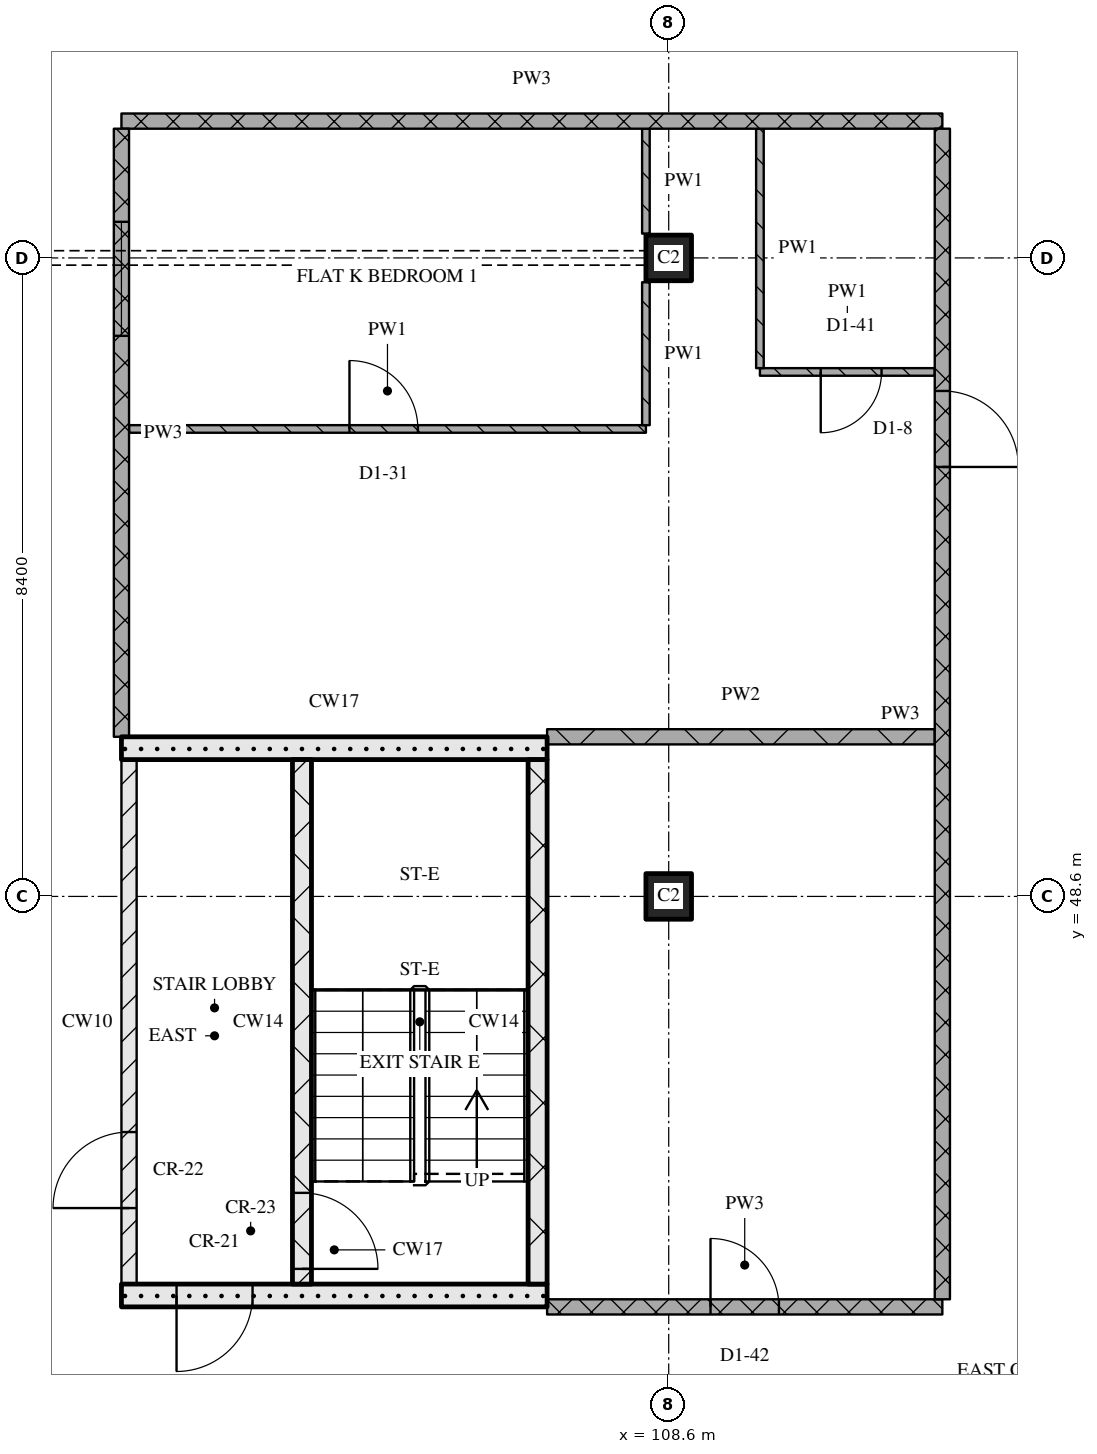
"""IFC4 building model, lengths in metres.
Left out: names, types, materials, properties, quantities, classifications, styles, units other than length and angle.
Written with IfcOpenShell. Run it as: python <this file> out.ifc"""

import sys

from ifc_helpers import new_model, si_unit, direction, frame, frame_2d, origin, origin_2d, place, context, subcontext, project, spatial, rectangle, extrude, element, fill, save


model = new_model("IFC4")
c1 = context("Model", 3, precision=1e-05, world=origin(), true_north=direction((0.0, 1.0)))
c2 = subcontext(c1, "Body", "Model", "MODEL_VIEW")
j1 = project(units=[si_unit("LENGTHUNIT", "METRE"), si_unit("PLANEANGLEUNIT", "RADIAN")], contexts=[c1])
p1 = place(None, origin())
s1 = spatial("IfcSite", under=j1, at=p1, CompositionType="ELEMENT")
p2 = place(p1, origin())
s2 = spatial("IfcBuilding", under=s1, at=p2, CompositionType="ELEMENT")
p3 = place(p2, frame((0.0, 0.0, 212.7)))
s3 = spatial("IfcBuildingStorey", under=s2, at=p3, CompositionType="ELEMENT", Elevation=212.7)
for number, where, z_axis, x_axis in (
    (1, (108.6, 48.6, 0.0), (0.0, 0.0, 1.0), (1.0, 0.0, 0.0)),
    (2, (108.6, 57.0, 0.0), (0.0, 0.0, 1.0), (1.0, 0.0, 0.0)),
):
    element("IfcColumn", number, at=place(p3, frame(where, z_axis=z_axis, x_axis=x_axis)), inside=s3, PredefinedType="COLUMN", context=c2, shape_type="SweptSolid", body=[
        extrude(rectangle(XDim=0.6, YDim=0.6, at=origin_2d()), origin(), (0.0, 0.0, 1.0), 3.6),
    ])
p4 = place(p3, frame((101.4, 43.35, 0.0), z_axis=(0.0, 0.0, 1.0), x_axis=(1.0, 0.0, 0.0)))
e3 = element("IfcWall", 3, at=p4, inside=s3, PredefinedType="SOLIDWALL", context=c2, shape_type="SweptSolid", body=[
    extrude(rectangle(XDim=5.6, YDim=0.3, at=frame_2d((2.8, 0.0))), origin(), (0.0, 0.0, 1.0), 3.32),
])
p5 = place(p4, frame((0.725, 0.0, 0.0)))
e4 = element("IfcOpeningElement", 4, at=p5, cuts=e3, PredefinedType="OPENING", context=c2, shape_type="SweptSolid", body=[
    extrude(rectangle(XDim=1.0, YDim=2.1, at=frame_2d((0.5, 1.05))), frame((0.0, 0.16, 0.0), z_axis=(0.0, -1.0, 0.0), x_axis=(1.0, 0.0, 0.0)), (0.0, 0.0, 1.0), 0.32),
])
p6 = place(p3, frame((101.5, 43.5, 0.0), z_axis=(0.0, 0.0, 1.0), x_axis=(0.0, 1.0, 0.0)))
e5 = element("IfcWall", 5, at=p6, inside=s3, PredefinedType="PARTITIONING", context=c2, shape_type="SweptSolid", body=[
    extrude(rectangle(XDim=6.9, YDim=0.2, at=frame_2d((3.45, 0.0))), origin(), (0.0, 0.0, 1.0), 3.32),
])
p7 = place(p6, frame((1.0, 0.0, 0.0)))
e6 = element("IfcOpeningElement", 6, at=p7, cuts=e5, PredefinedType="OPENING", context=c2, shape_type="SweptSolid", body=[
    extrude(rectangle(XDim=1.0, YDim=2.1, at=frame_2d((0.5, 1.05))), frame((0.0, 0.11, 0.0), z_axis=(0.0, -1.0, 0.0), x_axis=(1.0, 0.0, 0.0)), (0.0, 0.0, 1.0), 0.22),
])
p8 = place(p3, frame((103.775, 43.5, 0.0), z_axis=(0.0, 0.0, 1.0), x_axis=(0.0, 1.0, 0.0)))
e7 = element("IfcWall", 7, at=p8, inside=s3, PredefinedType="SOLIDWALL", context=c2, shape_type="SweptSolid", body=[
    extrude(rectangle(XDim=6.9, YDim=0.25, at=frame_2d((3.45, 0.0))), origin(), (0.0, 0.0, 1.0), 3.32),
])
p9 = place(p8, frame((0.2, 0.0, 0.0)))
e8 = element("IfcOpeningElement", 8, at=p9, cuts=e7, PredefinedType="OPENING", context=c2, shape_type="SweptSolid", body=[
    extrude(rectangle(XDim=1.0, YDim=2.1, at=frame_2d((0.5, 1.05))), frame((0.0, 0.135, 0.0), z_axis=(0.0, -1.0, 0.0), x_axis=(1.0, 0.0, 0.0)), (0.0, 0.0, 1.0), 0.27),
])
p10 = place(p3, frame((106.875, 43.5, 0.0), z_axis=(0.0, 0.0, 1.0), x_axis=(0.0, 1.0, 0.0)))
e9 = element("IfcWall", 9, at=p10, inside=s3, PredefinedType="SOLIDWALL", context=c2, shape_type="SweptSolid", body=[
    extrude(rectangle(XDim=6.9, YDim=0.25, at=frame_2d((3.45, 0.0))), origin(), (0.0, 0.0, 1.0), 3.32),
])
p11 = place(p3, frame((101.4, 50.55, 0.0), z_axis=(0.0, 0.0, 1.0), x_axis=(1.0, 0.0, 0.0)))
e10 = element("IfcWall", 10, at=p11, inside=s3, PredefinedType="SOLIDWALL", context=c2, shape_type="SweptSolid", body=[
    extrude(rectangle(XDim=5.6, YDim=0.3, at=frame_2d((2.8, 0.0))), origin(), (0.0, 0.0, 1.0), 3.32),
])
p12 = place(p3, frame((107.0, 43.2, 0.0), z_axis=(0.0, 0.0, 1.0), x_axis=(1.0, 0.0, 0.0)))
e11 = element("IfcWall", 11, at=p12, inside=s3, PredefinedType="PARTITIONING", context=c2, shape_type="SweptSolid", body=[
    extrude(rectangle(XDim=5.2, YDim=0.2, at=frame_2d((2.6, 0.0))), origin(), (0.0, 0.0, 1.0), 3.32),
])
p13 = place(p12, frame((2.15, 0.0, 0.0)))
e12 = element("IfcOpeningElement", 12, at=p13, cuts=e11, PredefinedType="OPENING", context=c2, shape_type="SweptSolid", body=[
    extrude(rectangle(XDim=0.9, YDim=2.1, at=frame_2d((0.45, 1.05))), frame((0.0, 0.11, 0.0), z_axis=(0.0, -1.0, 0.0), x_axis=(1.0, 0.0, 0.0)), (0.0, 0.0, 1.0), 0.22),
])
p14 = place(p3, frame((107.0, 50.7, 0.0), z_axis=(0.0, 0.0, 1.0), x_axis=(1.0, 0.0, 0.0)))
e13 = element("IfcWall", 13, at=p14, inside=s3, PredefinedType="PARTITIONING", context=c2, shape_type="SweptSolid", body=[
    extrude(rectangle(XDim=5.1, YDim=0.2, at=frame_2d((2.55, 0.0))), origin(), (0.0, 0.0, 1.0), 3.32),
])
p15 = place(p3, frame((101.5, 54.75, 0.0), z_axis=(0.0, 0.0, 1.0), x_axis=(1.0, 0.0, 0.0)))
e14 = element("IfcWall", 14, at=p15, inside=s3, PredefinedType="PARTITIONING", context=c2, shape_type="SweptSolid", body=[
    extrude(rectangle(XDim=6.8, YDim=0.1, at=frame_2d((3.4, 0.0))), origin(), (0.0, 0.0, 1.0), 3.32),
])
p16 = place(p15, frame((2.9, 0.0, 0.0)))
e15 = element("IfcOpeningElement", 15, at=p16, cuts=e14, PredefinedType="OPENING", context=c2, shape_type="SweptSolid", body=[
    extrude(rectangle(XDim=0.9, YDim=2.1, at=frame_2d((0.45, 1.05))), frame((0.0, 0.06, 0.0), z_axis=(0.0, -1.0, 0.0), x_axis=(1.0, 0.0, 0.0)), (0.0, 0.0, 1.0), 0.12),
])
p17 = place(p3, frame((109.8, 55.5, 0.0), z_axis=(0.0, 0.0, 1.0), x_axis=(1.0, 0.0, 0.0)))
e16 = element("IfcWall", 16, at=p17, inside=s3, PredefinedType="PARTITIONING", context=c2, shape_type="SweptSolid", body=[
    extrude(rectangle(XDim=2.3, YDim=0.1, at=frame_2d((1.15, 0.0))), origin(), (0.0, 0.0, 1.0), 3.32),
])
p18 = place(p17, frame((0.8, 0.0, 0.0)))
e17 = element("IfcOpeningElement", 17, at=p18, cuts=e16, PredefinedType="OPENING", context=c2, shape_type="SweptSolid", body=[
    extrude(rectangle(XDim=0.8, YDim=2.1, at=frame_2d((0.4, 1.05))), frame((0.0, 0.06, 0.0), z_axis=(0.0, -1.0, 0.0), x_axis=(1.0, 0.0, 0.0)), (0.0, 0.0, 1.0), 0.12),
])
p19 = place(p3, frame((101.4, 58.8, 0.0), z_axis=(0.0, 0.0, 1.0), x_axis=(1.0, 0.0, 0.0)))
e18 = element("IfcWall", 18, at=p19, inside=s3, PredefinedType="PARTITIONING", context=c2, shape_type="SweptSolid", body=[
    extrude(rectangle(XDim=10.8, YDim=0.2, at=frame_2d((5.4, 0.0))), origin(), (0.0, 0.0, 1.0), 3.32),
])
p20 = place(p3, frame((101.4, 58.7, 0.0), z_axis=(0.0, 0.0, 1.0), x_axis=(0.0, -1.0, 0.0)))
e19 = element("IfcWall", 19, at=p20, inside=s3, PredefinedType="PARTITIONING", context=c2, shape_type="SweptSolid", body=[
    extrude(rectangle(XDim=8.0, YDim=0.2, at=frame_2d((4.0, 0.0))), origin(), (0.0, 0.0, 1.0), 3.32),
])
p21 = place(p20, frame((1.225, 0.0, 0.9)))
e20 = element("IfcOpeningElement", 20, at=p21, cuts=e19, PredefinedType="OPENING", context=c2, shape_type="SweptSolid", body=[
    extrude(rectangle(XDim=1.5, YDim=1.5, at=frame_2d((0.75, 0.75))), frame((0.0, 0.11, 0.0), z_axis=(0.0, -1.0, 0.0), x_axis=(1.0, 0.0, 0.0)), (0.0, 0.0, 1.0), 0.22),
])
p22 = place(p3, frame((108.3, 56.68, 0.0), z_axis=(0.0, 0.0, 1.0), x_axis=(0.0, -1.0, 0.0)))
e21 = element("IfcWall", 21, at=p22, inside=s3, PredefinedType="PARTITIONING", context=c2, shape_type="SweptSolid", body=[
    extrude(rectangle(XDim=1.88, YDim=0.1, at=frame_2d((0.94, 0.0))), origin(), (0.0, 0.0, 1.0), 3.32),
])
p23 = place(p3, frame((108.3, 58.7, 0.0), z_axis=(0.0, 0.0, 1.0), x_axis=(0.0, -1.0, 0.0)))
e22 = element("IfcWall", 22, at=p23, inside=s3, PredefinedType="PARTITIONING", context=c2, shape_type="SweptSolid", body=[
    extrude(rectangle(XDim=1.38, YDim=0.1, at=frame_2d((0.69, 0.0))), origin(), (0.0, 0.0, 1.0), 3.32),
])
p24 = place(p3, frame((109.8, 58.7, 0.0), z_axis=(0.0, 0.0, 1.0), x_axis=(0.0, -1.0, 0.0)))
e23 = element("IfcWall", 23, at=p24, inside=s3, PredefinedType="PARTITIONING", context=c2, shape_type="SweptSolid", body=[
    extrude(rectangle(XDim=3.15, YDim=0.1, at=frame_2d((1.575, 0.0))), origin(), (0.0, 0.0, 1.0), 3.32),
])
p25 = place(p3, frame((112.2, 43.3, 0.0), z_axis=(0.0, 0.0, 1.0), x_axis=(0.0, 1.0, 0.0)))
e24 = element("IfcWall", 24, at=p25, inside=s3, PredefinedType="PARTITIONING", context=c2, shape_type="SweptSolid", body=[
    extrude(rectangle(XDim=15.4, YDim=0.2, at=frame_2d((7.7, 0.0))), origin(), (0.0, 0.0, 1.0), 3.32),
])
p26 = place(p25, frame((10.95, 0.0, 0.0)))
e25 = element("IfcOpeningElement", 25, at=p26, cuts=e24, PredefinedType="OPENING", context=c2, shape_type="SweptSolid", body=[
    extrude(rectangle(XDim=1.0, YDim=2.1, at=frame_2d((0.5, 1.05))), frame((0.0, 0.11, 0.0), z_axis=(0.0, -1.0, 0.0), x_axis=(1.0, 0.0, 0.0)), (0.0, 0.0, 1.0), 0.22),
])
p27 = place(p5, origin())
e26 = element("IfcDoor", 26, at=p27, inside=s3, OperationType="SINGLE_SWING_RIGHT", PredefinedType="DOOR", context=c2, shape_type="SweptSolid", body=[
    extrude(rectangle(XDim=1.0, YDim=2.1, at=frame_2d((0.5, 1.05))), frame((0.0, 0.025, 0.0), z_axis=(0.0, -1.0, 0.0), x_axis=(1.0, 0.0, 0.0)), (0.0, 0.0, 1.0), 0.05),
])
fill(e4, e26)
p28 = place(p9, origin())
e27 = element("IfcDoor", 27, at=p28, inside=s3, OperationType="SINGLE_SWING_RIGHT", PredefinedType="DOOR", context=c2, shape_type="SweptSolid", body=[
    extrude(rectangle(XDim=1.0, YDim=2.1, at=frame_2d((0.5, 1.05))), frame((0.0, 0.025, 0.0), z_axis=(0.0, -1.0, 0.0), x_axis=(1.0, 0.0, 0.0)), (0.0, 0.0, 1.0), 0.05),
])
fill(e8, e27)
p29 = place(p7, origin())
e28 = element("IfcDoor", 28, at=p29, inside=s3, OperationType="SINGLE_SWING_LEFT", PredefinedType="DOOR", context=c2, shape_type="SweptSolid", body=[
    extrude(rectangle(XDim=1.0, YDim=2.1, at=frame_2d((0.5, 1.05))), frame((0.0, 0.025, 0.0), z_axis=(0.0, -1.0, 0.0), x_axis=(1.0, 0.0, 0.0)), (0.0, 0.0, 1.0), 0.05),
])
fill(e6, e28)
p30 = place(p13, origin())
e29 = element("IfcDoor", 29, at=p30, inside=s3, OperationType="SINGLE_SWING_LEFT", PredefinedType="DOOR", context=c2, shape_type="SweptSolid", body=[
    extrude(rectangle(XDim=0.9, YDim=2.1, at=frame_2d((0.45, 1.05))), frame((0.0, 0.025, 0.0), z_axis=(0.0, -1.0, 0.0), x_axis=(1.0, 0.0, 0.0)), (0.0, 0.0, 1.0), 0.05),
])
fill(e12, e29)
p31 = place(p16, origin())
e30 = element("IfcDoor", 30, at=p31, inside=s3, OperationType="SINGLE_SWING_LEFT", PredefinedType="DOOR", context=c2, shape_type="SweptSolid", body=[
    extrude(rectangle(XDim=0.9, YDim=2.1, at=frame_2d((0.45, 1.05))), frame((0.0, 0.025, 0.0), z_axis=(0.0, -1.0, 0.0), x_axis=(1.0, 0.0, 0.0)), (0.0, 0.0, 1.0), 0.05),
])
fill(e15, e30)
p32 = place(p18, origin())
e31 = element("IfcDoor", 31, at=p32, inside=s3, OperationType="SINGLE_SWING_RIGHT", PredefinedType="DOOR", context=c2, shape_type="SweptSolid", body=[
    extrude(rectangle(XDim=0.8, YDim=2.1, at=frame_2d((0.4, 1.05))), frame((0.0, 0.025, 0.0), z_axis=(0.0, -1.0, 0.0), x_axis=(1.0, 0.0, 0.0)), (0.0, 0.0, 1.0), 0.05),
])
fill(e17, e31)
p33 = place(p26, origin())
e32 = element("IfcDoor", 32, at=p33, inside=s3, OperationType="SINGLE_SWING_RIGHT", PredefinedType="DOOR", context=c2, shape_type="SweptSolid", body=[
    extrude(rectangle(XDim=1.0, YDim=2.1, at=frame_2d((0.5, 1.05))), frame((0.0, 0.025, 0.0), z_axis=(0.0, -1.0, 0.0), x_axis=(1.0, 0.0, 0.0)), (0.0, 0.0, 1.0), 0.05),
])
fill(e25, e32)
p34 = place(p21, origin())
e33 = element("IfcWindow", 33, at=p34, inside=s3, PartitioningType="SINGLE_PANEL", PredefinedType="WINDOW", context=c2, shape_type="SweptSolid", body=[
    extrude(rectangle(XDim=1.5, YDim=1.5, at=frame_2d((0.75, 0.75))), frame((0.0, 0.03, 0.0), z_axis=(0.0, -1.0, 0.0), x_axis=(1.0, 0.0, 0.0)), (0.0, 0.0, 1.0), 0.06),
])
fill(e20, e33)
save(model, sys.argv[1])
